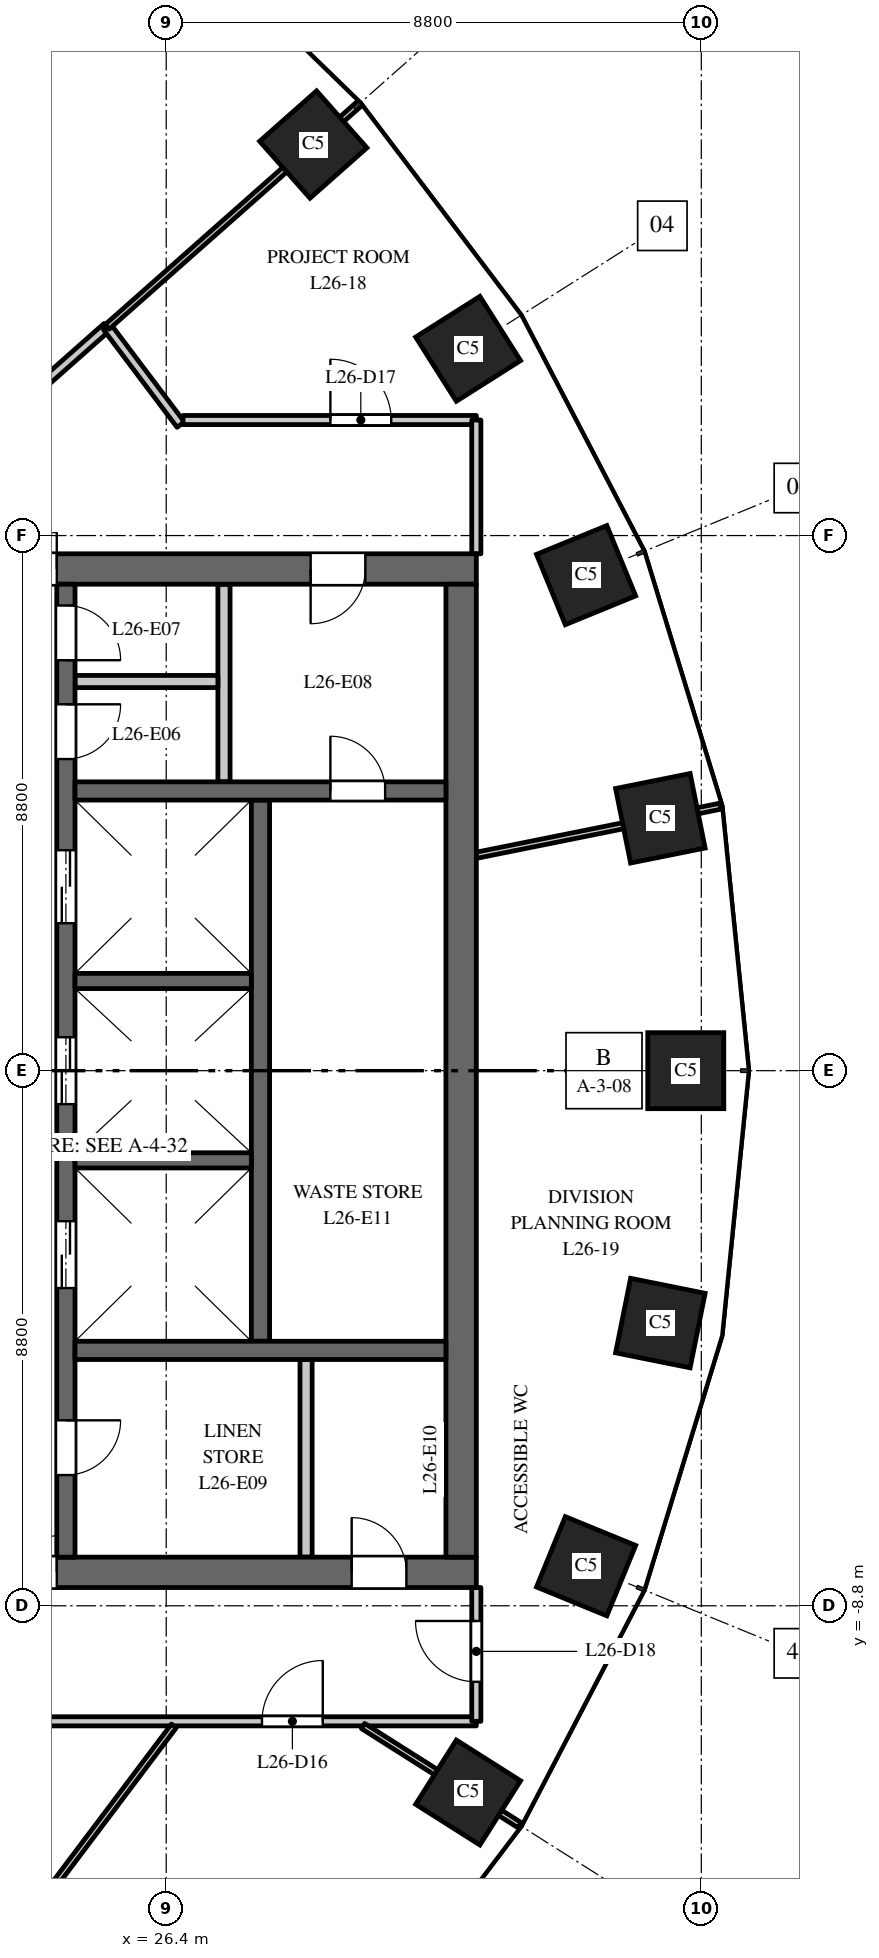
"""IFC4 building model, lengths in metres.
Left out: names, types, materials, properties, quantities, classifications, styles, units other than length and angle.
Written with IfcOpenShell. Run it as: python <this file> out.ifc"""

import sys

from ifc_helpers import new_model, si_unit, direction, frame, frame_2d, origin, origin_2d, place, context, subcontext, project, spatial, rectangle, extrude, element, fill, save


model = new_model("IFC4")
c1 = context("Model", 3, precision=1e-05, world=origin(), true_north=direction((0.0, 1.0)))
c2 = subcontext(c1, "Body", "Model", "MODEL_VIEW")
j1 = project(units=[si_unit("LENGTHUNIT", "METRE"), si_unit("PLANEANGLEUNIT", "RADIAN")], contexts=[c1])
p1 = place(None, origin())
s1 = spatial("IfcSite", under=j1, at=p1, CompositionType="ELEMENT")
p2 = place(p1, origin())
s2 = spatial("IfcBuilding", under=s1, at=p2, CompositionType="ELEMENT")
p3 = place(p2, frame((0.0, 0.0, 116.0)))
s3 = spatial("IfcBuildingStorey", under=s2, at=p3, CompositionType="ELEMENT", Elevation=116.0)
for number, where, z_axis, x_axis in (
    (1, (34.945, 0.0, 0.0), (0.0, 0.0, 1.0), (0.0, 1.0, 0.0)),
    (2, (34.527, 4.151, 0.0), (0.0, 0.0, 1.0), (-0.197, 0.98, 0.0)),
    (3, (33.305, 8.149, 0.0), (0.0, 0.0, 1.0), (-0.379, 0.925, 0.0)),
    (4, (31.365, 11.871, 0.0), (0.0, 0.0, 1.0), (-0.535, 0.845, 0.0)),
    (5, (28.819, 15.23, 0.0), (0.0, 0.0, 1.0), (-0.663, 0.749, 0.0)),
    (6, (31.365, -11.871, 0.0), (0.0, 0.0, 1.0), (0.535, 0.845, 0.0)),
    (7, (33.305, -8.149, 0.0), (0.0, 0.0, 1.0), (0.379, 0.925, 0.0)),
    (8, (34.527, -4.151, 0.0), (0.0, 0.0, 1.0), (0.197, 0.98, 0.0)),
):
    element("IfcColumn", number, at=place(p3, frame(where, z_axis=z_axis, x_axis=x_axis)), inside=s3, PredefinedType="COLUMN", context=c2, shape_type="SweptSolid", body=[
        extrude(rectangle(XDim=1.25, YDim=1.25, at=origin_2d()), origin(), (0.0, 0.0, 1.0), 4.0),
    ])
p4 = place(p3, frame((16.5, 8.25, 0.0), z_axis=(0.0, 0.0, 1.0), x_axis=(1.0, 0.0, 0.0)))
e9 = element("IfcWall", 9, at=p4, inside=s3, PredefinedType="SHEAR", context=c2, shape_type="SweptSolid", body=[
    extrude(rectangle(XDim=15.0, YDim=0.5, at=frame_2d((7.5, 0.0))), origin(), (0.0, 0.0, 1.0), 3.7),
])
p5 = place(p4, frame((6.9, 0.0, 0.0)))
e10 = element("IfcOpeningElement", 10, at=p5, cuts=e9, PredefinedType="OPENING", context=c2, shape_type="SweptSolid", body=[
    extrude(rectangle(XDim=1.2, YDim=2.1, at=frame_2d((0.6, 1.05))), frame((0.0, 0.26, 0.0), z_axis=(0.0, -1.0, 0.0), x_axis=(1.0, 0.0, 0.0)), (0.0, 0.0, 1.0), 0.52),
])
p6 = place(p4, frame((12.275, 0.0, 0.0)))
e11 = element("IfcOpeningElement", 11, at=p6, cuts=e9, PredefinedType="OPENING", context=c2, shape_type="SweptSolid", body=[
    extrude(rectangle(XDim=0.9, YDim=2.1, at=frame_2d((0.45, 1.05))), frame((0.0, 0.26, 0.0), z_axis=(0.0, -1.0, 0.0), x_axis=(1.0, 0.0, 0.0)), (0.0, 0.0, 1.0), 0.52),
])
p7 = place(p3, frame((16.5, -8.25, 0.0), z_axis=(0.0, 0.0, 1.0), x_axis=(1.0, 0.0, 0.0)))
e12 = element("IfcWall", 12, at=p7, inside=s3, PredefinedType="SHEAR", context=c2, shape_type="SweptSolid", body=[
    extrude(rectangle(XDim=15.0, YDim=0.5, at=frame_2d((7.5, 0.0))), origin(), (0.0, 0.0, 1.0), 3.7),
])
p8 = place(p7, frame((6.9, 0.0, 0.0)))
e13 = element("IfcOpeningElement", 13, at=p8, cuts=e12, PredefinedType="OPENING", context=c2, shape_type="SweptSolid", body=[
    extrude(rectangle(XDim=1.2, YDim=2.1, at=frame_2d((0.6, 1.05))), frame((0.0, 0.26, 0.0), z_axis=(0.0, -1.0, 0.0), x_axis=(1.0, 0.0, 0.0)), (0.0, 0.0, 1.0), 0.52),
])
p9 = place(p7, frame((12.95, 0.0, 0.0)))
e14 = element("IfcOpeningElement", 14, at=p9, cuts=e12, PredefinedType="OPENING", context=c2, shape_type="SweptSolid", body=[
    extrude(rectangle(XDim=0.9, YDim=2.1, at=frame_2d((0.45, 1.05))), frame((0.0, 0.26, 0.0), z_axis=(0.0, -1.0, 0.0), x_axis=(1.0, 0.0, 0.0)), (0.0, 0.0, 1.0), 0.52),
])
p10 = place(p3, frame((27.95, -4.45, 0.0), z_axis=(0.0, 0.0, 1.0), x_axis=(0.0, 1.0, 0.0)))
e15 = element("IfcWall", 15, at=p10, inside=s3, PredefinedType="SHEAR", context=c2, shape_type="SweptSolid", body=[
    extrude(rectangle(XDim=8.9, YDim=0.3, at=frame_2d((4.45, 0.0))), origin(), (0.0, 0.0, 1.0), 3.7),
])
p11 = place(p3, frame((24.75, -8.0, 0.0), z_axis=(0.0, 0.0, 1.0), x_axis=(0.0, 1.0, 0.0)))
e16 = element("IfcWall", 16, at=p11, inside=s3, PredefinedType="SHEAR", context=c2, shape_type="SweptSolid", body=[
    extrude(rectangle(XDim=16.0, YDim=0.3, at=frame_2d((8.0, 0.0))), origin(), (0.0, 0.0, 1.0), 3.7),
])
p12 = place(p11, frame((4.425, 0.0, 0.0)))
e17 = element("IfcOpeningElement", 17, at=p12, cuts=e16, PredefinedType="OPENING", context=c2, shape_type="SweptSolid", body=[
    extrude(rectangle(XDim=1.1, YDim=2.1, at=frame_2d((0.55, 1.05))), frame((0.0, 0.16, 0.0), z_axis=(0.0, -1.0, 0.0), x_axis=(1.0, 0.0, 0.0)), (0.0, 0.0, 1.0), 0.32),
])
p13 = place(p11, frame((7.45, 0.0, 0.0)))
e18 = element("IfcOpeningElement", 18, at=p13, cuts=e16, PredefinedType="OPENING", context=c2, shape_type="SweptSolid", body=[
    extrude(rectangle(XDim=1.1, YDim=2.1, at=frame_2d((0.55, 1.05))), frame((0.0, 0.16, 0.0), z_axis=(0.0, -1.0, 0.0), x_axis=(1.0, 0.0, 0.0)), (0.0, 0.0, 1.0), 0.32),
])
p14 = place(p11, frame((10.425, 0.0, 0.0)))
e19 = element("IfcOpeningElement", 19, at=p14, cuts=e16, PredefinedType="OPENING", context=c2, shape_type="SweptSolid", body=[
    extrude(rectangle(XDim=1.2, YDim=2.1, at=frame_2d((0.6, 1.05))), frame((0.0, 0.16, 0.0), z_axis=(0.0, -1.0, 0.0), x_axis=(1.0, 0.0, 0.0)), (0.0, 0.0, 1.0), 0.32),
])
p15 = place(p11, frame((13.125, 0.0, 0.0)))
e20 = element("IfcOpeningElement", 20, at=p15, cuts=e16, PredefinedType="OPENING", context=c2, shape_type="SweptSolid", body=[
    extrude(rectangle(XDim=0.9, YDim=2.1, at=frame_2d((0.45, 1.05))), frame((0.0, 0.16, 0.0), z_axis=(0.0, -1.0, 0.0), x_axis=(1.0, 0.0, 0.0)), (0.0, 0.0, 1.0), 0.32),
])
p16 = place(p11, frame((14.75, 0.0, 0.0)))
e21 = element("IfcOpeningElement", 21, at=p16, cuts=e16, PredefinedType="OPENING", context=c2, shape_type="SweptSolid", body=[
    extrude(rectangle(XDim=0.9, YDim=2.1, at=frame_2d((0.45, 1.05))), frame((0.0, 0.16, 0.0), z_axis=(0.0, -1.0, 0.0), x_axis=(1.0, 0.0, 0.0)), (0.0, 0.0, 1.0), 0.32),
])
p17 = place(p11, frame((1.35, 0.0, 0.0)))
e22 = element("IfcOpeningElement", 22, at=p17, cuts=e16, PredefinedType="OPENING", context=c2, shape_type="SweptSolid", body=[
    extrude(rectangle(XDim=0.9, YDim=2.1, at=frame_2d((0.45, 1.05))), frame((0.0, 0.16, 0.0), z_axis=(0.0, -1.0, 0.0), x_axis=(1.0, 0.0, 0.0)), (0.0, 0.0, 1.0), 0.32),
])
p18 = place(p3, frame((31.25, -8.0, 0.0), z_axis=(0.0, 0.0, 1.0), x_axis=(0.0, 1.0, 0.0)))
e23 = element("IfcWall", 23, at=p18, inside=s3, PredefinedType="SHEAR", context=c2, shape_type="SweptSolid", body=[
    extrude(rectangle(XDim=16.0, YDim=0.5, at=frame_2d((8.0, 0.0))), origin(), (0.0, 0.0, 1.0), 3.7),
])
p19 = place(p3, frame((24.9, 4.6, 0.0), z_axis=(0.0, 0.0, 1.0), x_axis=(1.0, 0.0, 0.0)))
e24 = element("IfcWall", 24, at=p19, inside=s3, PredefinedType="SHEAR", context=c2, shape_type="SweptSolid", body=[
    extrude(rectangle(XDim=6.1, YDim=0.3, at=frame_2d((3.05, 0.0))), origin(), (0.0, 0.0, 1.0), 3.7),
])
p20 = place(p19, frame((4.2, 0.0, 0.0)))
e25 = element("IfcOpeningElement", 25, at=p20, cuts=e24, PredefinedType="OPENING", context=c2, shape_type="SweptSolid", body=[
    extrude(rectangle(XDim=0.9, YDim=2.1, at=frame_2d((0.45, 1.05))), frame((0.0, 0.16, 0.0), z_axis=(0.0, -1.0, 0.0), x_axis=(1.0, 0.0, 0.0)), (0.0, 0.0, 1.0), 0.32),
])
for number, where, z_axis, x_axis in (
    (26, (27.35, 4.75, 0.0), (0.0, 0.0, 1.0), (0.0, 1.0, 0.0)),
    (27, (28.7, -8.0, 0.0), (0.0, 0.0, 1.0), (0.0, 1.0, 0.0)),
):
    element("IfcWall", number, at=place(p3, frame(where, z_axis=z_axis, x_axis=x_axis)), inside=s3, PredefinedType="PARTITIONING", context=c2, shape_type="SweptSolid", body=[
        extrude(rectangle(XDim=3.25, YDim=0.2, at=frame_2d((1.625, 0.0))), origin(), (0.0, 0.0, 1.0), 3.7),
    ])
p21 = place(p3, frame((24.9, 6.4, 0.0), z_axis=(0.0, 0.0, 1.0), x_axis=(1.0, 0.0, 0.0)))
e28 = element("IfcWall", 28, at=p21, inside=s3, PredefinedType="PARTITIONING", context=c2, shape_type="SweptSolid", body=[
    extrude(rectangle(XDim=2.35, YDim=0.2, at=frame_2d((1.175, 0.0))), origin(), (0.0, 0.0, 1.0), 3.7),
])
p22 = place(p3, frame((24.9, -4.6, 0.0), z_axis=(0.0, 0.0, 1.0), x_axis=(1.0, 0.0, 0.0)))
e29 = element("IfcWall", 29, at=p22, inside=s3, PredefinedType="SHEAR", context=c2, shape_type="SweptSolid", body=[
    extrude(rectangle(XDim=6.1, YDim=0.3, at=frame_2d((3.05, 0.0))), origin(), (0.0, 0.0, 1.0), 3.7),
])
for number, where, z_axis, x_axis in (
    (30, (24.9, -1.475, 0.0), (0.0, 0.0, 1.0), (1.0, 0.0, 0.0)),
    (31, (24.9, 1.475, 0.0), (0.0, 0.0, 1.0), (1.0, 0.0, 0.0)),
):
    element("IfcWall", number, at=place(p3, frame(where, z_axis=z_axis, x_axis=x_axis)), inside=s3, PredefinedType="SHEAR", context=c2, shape_type="SweptSolid", body=[
        extrude(rectangle(XDim=2.9, YDim=0.25, at=frame_2d((1.45, 0.0))), origin(), (0.0, 0.0, 1.0), 3.7),
    ])
p23 = place(p3, frame((20.603, -10.7, 0.0), z_axis=(0.0, 0.0, 1.0), x_axis=(1.0, 0.0, 0.0)))
e32 = element("IfcWall", 32, at=p23, inside=s3, PredefinedType="PARTITIONING", context=c2, shape_type="SweptSolid", body=[
    extrude(rectangle(XDim=10.897, YDim=0.15, at=frame_2d((5.448, 0.0))), origin(), (0.0, 0.0, 1.0), 2.9),
])
p24 = place(p23, frame((0.542, 0.0, 0.0)))
e33 = element("IfcOpeningElement", 33, at=p24, cuts=e32, PredefinedType="OPENING", context=c2, shape_type="SweptSolid", body=[
    extrude(rectangle(XDim=1.0, YDim=2.1, at=frame_2d((0.5, 1.05))), frame((0.0, 0.085, 0.0), z_axis=(0.0, -1.0, 0.0), x_axis=(1.0, 0.0, 0.0)), (0.0, 0.0, 1.0), 0.17),
])
p25 = place(p23, frame((7.372, 0.0, 0.0)))
e34 = element("IfcOpeningElement", 34, at=p25, cuts=e32, PredefinedType="OPENING", context=c2, shape_type="SweptSolid", body=[
    extrude(rectangle(XDim=1.0, YDim=2.1, at=frame_2d((0.5, 1.05))), frame((0.0, 0.085, 0.0), z_axis=(0.0, -1.0, 0.0), x_axis=(1.0, 0.0, 0.0)), (0.0, 0.0, 1.0), 0.17),
])
p26 = place(p3, frame((23.298, -15.06, 0.0), z_axis=(0.0, 0.0, 1.0), x_axis=(0.601658833238, 0.798753183647, 0.0)))
e35 = element("IfcWall", 35, at=p26, inside=s3, PredefinedType="PARTITIONING", context=c2, shape_type="SweptSolid", body=[
    extrude(rectangle(XDim=5.365, YDim=0.1, at=frame_2d((2.682, 0.0))), origin(), (0.0, 0.0, 1.0), 2.75),
])
p27 = place(p3, frame((23.785, 10.778, 0.0), z_axis=(0.0, 0.0, 1.0), x_axis=(0.748911595987, 0.662669918886, 0.0)))
e36 = element("IfcWall", 36, at=p27, inside=s3, PredefinedType="PARTITIONING", context=c2, shape_type="SweptSolid", body=[
    extrude(rectangle(XDim=2.194, YDim=0.15, at=frame_2d((1.097, 0.0))), origin(), (0.0, 0.0, 1.0), 3.7),
])
p28 = place(p3, frame((25.428, 12.232, 0.0), z_axis=(0.0, 0.0, 1.0), x_axis=(0.601513631979, -0.798862535449, 0.0)))
e37 = element("IfcWall", 37, at=p28, inside=s3, PredefinedType="PARTITIONING", context=c2, shape_type="SweptSolid", body=[
    extrude(rectangle(XDim=2.011, YDim=0.15, at=frame_2d((1.006, 0.0))), origin(), (0.0, 0.0, 1.0), 3.7),
])
p29 = place(p3, frame((25.428, 12.232, 0.0), z_axis=(0.0, 0.0, 1.0), x_axis=(0.749015105068, 0.662552920437, 0.0)))
e38 = element("IfcWall", 38, at=p29, inside=s3, PredefinedType="PARTITIONING", context=c2, shape_type="SweptSolid", body=[
    extrude(rectangle(XDim=5.529, YDim=0.1, at=frame_2d((2.764, 0.0))), origin(), (0.0, 0.0, 1.0), 3.7),
])
p30 = place(p3, frame((26.676, 10.7, 0.0), z_axis=(0.0, 0.0, 1.0), x_axis=(1.0, 0.0, 0.0)))
e39 = element("IfcWall", 39, at=p30, inside=s3, PredefinedType="PARTITIONING", context=c2, shape_type="SweptSolid", body=[
    extrude(rectangle(XDim=4.824, YDim=0.15, at=frame_2d((2.412, 0.0))), origin(), (0.0, 0.0, 1.0), 2.9),
])
p31 = place(p30, frame((2.424, 0.0, 0.0)))
e40 = element("IfcOpeningElement", 40, at=p31, cuts=e39, PredefinedType="OPENING", context=c2, shape_type="SweptSolid", body=[
    extrude(rectangle(XDim=1.0, YDim=2.1, at=frame_2d((0.5, 1.05))), frame((0.0, 0.085, 0.0), z_axis=(0.0, -1.0, 0.0), x_axis=(1.0, 0.0, 0.0)), (0.0, 0.0, 1.0), 0.17),
])
p32 = place(p3, frame((29.637, -10.777, 0.0), z_axis=(0.0, 0.0, 1.0), x_axis=(0.844810627195, -0.535065420467, 0.0)))
e41 = element("IfcWall", 41, at=p32, inside=s3, PredefinedType="PARTITIONING", context=c2, shape_type="SweptSolid", body=[
    extrude(rectangle(XDim=3.048, YDim=0.1, at=frame_2d((1.524, 0.0))), origin(), (0.0, 0.0, 1.0), 2.9),
])
p33 = place(p3, frame((31.5, -10.7, 0.0), z_axis=(0.0, 0.0, 1.0), x_axis=(0.0, 1.0, 0.0)))
e42 = element("IfcWall", 42, at=p33, inside=s3, PredefinedType="PARTITIONING", context=c2, shape_type="SweptSolid", body=[
    extrude(rectangle(XDim=2.2, YDim=0.15, at=frame_2d((1.1, 0.0))), origin(), (0.0, 0.0, 1.0), 2.9),
])
p34 = place(p33, frame((0.65, 0.0, 0.0)))
e43 = element("IfcOpeningElement", 43, at=p34, cuts=e42, PredefinedType="OPENING", context=c2, shape_type="SweptSolid", body=[
    extrude(rectangle(XDim=1.0, YDim=2.1, at=frame_2d((0.5, 1.05))), frame((0.0, 0.085, 0.0), z_axis=(0.0, -1.0, 0.0), x_axis=(1.0, 0.0, 0.0)), (0.0, 0.0, 1.0), 0.17),
])
p35 = place(p3, frame((31.5, 3.542, 0.0), z_axis=(0.0, 0.0, 1.0), x_axis=(0.980357474535, 0.197228857227, 0.0)))
e44 = element("IfcWall", 44, at=p35, inside=s3, PredefinedType="PARTITIONING", context=c2, shape_type="SweptSolid", body=[
    extrude(rectangle(XDim=4.092, YDim=0.1, at=frame_2d((2.046, 0.0))), origin(), (0.0, 0.0, 1.0), 2.9),
])
p36 = place(p3, frame((31.5, 8.5, 0.0), z_axis=(0.0, 0.0, 1.0), x_axis=(0.0, 1.0, 0.0)))
e45 = element("IfcWall", 45, at=p36, inside=s3, PredefinedType="PARTITIONING", context=c2, shape_type="SweptSolid", body=[
    extrude(rectangle(XDim=2.2, YDim=0.15, at=frame_2d((1.1, 0.0))), origin(), (0.0, 0.0, 1.0), 2.9),
])
p37 = place(p12, origin())
e46 = element("IfcDoor", 46, at=p37, inside=s3, OperationType="DOUBLE_DOOR_SLIDING", PredefinedType="DOOR", context=c2, shape_type="SweptSolid", body=[
    extrude(rectangle(XDim=1.1, YDim=2.1, at=frame_2d((0.55, 1.05))), frame((0.0, 0.025, 0.0), z_axis=(0.0, -1.0, 0.0), x_axis=(1.0, 0.0, 0.0)), (0.0, 0.0, 1.0), 0.05),
])
fill(e17, e46)
p38 = place(p13, origin())
e47 = element("IfcDoor", 47, at=p38, inside=s3, OperationType="DOUBLE_DOOR_SLIDING", PredefinedType="DOOR", context=c2, shape_type="SweptSolid", body=[
    extrude(rectangle(XDim=1.1, YDim=2.1, at=frame_2d((0.55, 1.05))), frame((0.0, 0.025, 0.0), z_axis=(0.0, -1.0, 0.0), x_axis=(1.0, 0.0, 0.0)), (0.0, 0.0, 1.0), 0.05),
])
fill(e18, e47)
p39 = place(p14, origin())
e48 = element("IfcDoor", 48, at=p39, inside=s3, OperationType="DOUBLE_DOOR_SLIDING", PredefinedType="DOOR", context=c2, shape_type="SweptSolid", body=[
    extrude(rectangle(XDim=1.2, YDim=2.1, at=frame_2d((0.6, 1.05))), frame((0.0, 0.025, 0.0), z_axis=(0.0, -1.0, 0.0), x_axis=(1.0, 0.0, 0.0)), (0.0, 0.0, 1.0), 0.05),
])
fill(e19, e48)
p40 = place(p5, origin())
e49 = element("IfcDoor", 49, at=p40, inside=s3, OperationType="DOUBLE_DOOR_DOUBLE_SWING", PredefinedType="DOOR", context=c2, shape_type="SweptSolid", body=[
    extrude(rectangle(XDim=1.2, YDim=2.1, at=frame_2d((0.6, 1.05))), frame((0.0, 0.025, 0.0), z_axis=(0.0, -1.0, 0.0), x_axis=(1.0, 0.0, 0.0)), (0.0, 0.0, 1.0), 0.05),
])
fill(e10, e49)
p41 = place(p8, origin())
e50 = element("IfcDoor", 50, at=p41, inside=s3, OperationType="DOUBLE_DOOR_DOUBLE_SWING", PredefinedType="DOOR", context=c2, shape_type="SweptSolid", body=[
    extrude(rectangle(XDim=1.2, YDim=2.1, at=frame_2d((0.6, 1.05))), frame((0.0, 0.025, 0.0), z_axis=(0.0, -1.0, 0.0), x_axis=(1.0, 0.0, 0.0)), (0.0, 0.0, 1.0), 0.05),
])
fill(e13, e50)
p42 = place(p15, origin())
e51 = element("IfcDoor", 51, at=p42, inside=s3, OperationType="SINGLE_SWING_RIGHT", PredefinedType="DOOR", context=c2, shape_type="SweptSolid", body=[
    extrude(rectangle(XDim=0.9, YDim=2.1, at=frame_2d((0.45, 1.05))), frame((0.0, 0.025, 0.0), z_axis=(0.0, -1.0, 0.0), x_axis=(1.0, 0.0, 0.0)), (0.0, 0.0, 1.0), 0.05),
])
fill(e20, e51)
p43 = place(p16, origin())
e52 = element("IfcDoor", 52, at=p43, inside=s3, OperationType="SINGLE_SWING_LEFT", PredefinedType="DOOR", context=c2, shape_type="SweptSolid", body=[
    extrude(rectangle(XDim=0.9, YDim=2.1, at=frame_2d((0.45, 1.05))), frame((0.0, 0.025, 0.0), z_axis=(0.0, -1.0, 0.0), x_axis=(1.0, 0.0, 0.0)), (0.0, 0.0, 1.0), 0.05),
])
fill(e21, e52)
p44 = place(p6, origin())
e53 = element("IfcDoor", 53, at=p44, inside=s3, OperationType="SINGLE_SWING_LEFT", PredefinedType="DOOR", context=c2, shape_type="SweptSolid", body=[
    extrude(rectangle(XDim=0.9, YDim=2.1, at=frame_2d((0.45, 1.05))), frame((0.0, 0.025, 0.0), z_axis=(0.0, -1.0, 0.0), x_axis=(1.0, 0.0, 0.0)), (0.0, 0.0, 1.0), 0.05),
])
fill(e11, e53)
p45 = place(p17, origin())
e54 = element("IfcDoor", 54, at=p45, inside=s3, OperationType="SINGLE_SWING_RIGHT", PredefinedType="DOOR", context=c2, shape_type="SweptSolid", body=[
    extrude(rectangle(XDim=0.9, YDim=2.1, at=frame_2d((0.45, 1.05))), frame((0.0, 0.025, 0.0), z_axis=(0.0, -1.0, 0.0), x_axis=(1.0, 0.0, 0.0)), (0.0, 0.0, 1.0), 0.05),
])
fill(e22, e54)
p46 = place(p9, origin())
e55 = element("IfcDoor", 55, at=p46, inside=s3, OperationType="SINGLE_SWING_RIGHT", PredefinedType="DOOR", context=c2, shape_type="SweptSolid", body=[
    extrude(rectangle(XDim=0.9, YDim=2.1, at=frame_2d((0.45, 1.05))), frame((0.0, 0.025, 0.0), z_axis=(0.0, -1.0, 0.0), x_axis=(1.0, 0.0, 0.0)), (0.0, 0.0, 1.0), 0.05),
])
fill(e14, e55)
p47 = place(p20, origin())
e56 = element("IfcDoor", 56, at=p47, inside=s3, OperationType="SINGLE_SWING_RIGHT", PredefinedType="DOOR", context=c2, shape_type="SweptSolid", body=[
    extrude(rectangle(XDim=0.9, YDim=2.1, at=frame_2d((0.45, 1.05))), frame((0.0, 0.025, 0.0), z_axis=(0.0, -1.0, 0.0), x_axis=(1.0, 0.0, 0.0)), (0.0, 0.0, 1.0), 0.05),
])
fill(e25, e56)
p48 = place(p25, origin())
e57 = element("IfcDoor", 57, at=p48, inside=s3, OperationType="SINGLE_SWING_RIGHT", PredefinedType="DOOR", context=c2, shape_type="SweptSolid", body=[
    extrude(rectangle(XDim=1.0, YDim=2.1, at=frame_2d((0.5, 1.05))), frame((0.0, 0.025, 0.0), z_axis=(0.0, -1.0, 0.0), x_axis=(1.0, 0.0, 0.0)), (0.0, 0.0, 1.0), 0.05),
])
fill(e34, e57)
p49 = place(p31, origin())
e58 = element("IfcDoor", 58, at=p49, inside=s3, OperationType="SINGLE_SWING_LEFT", PredefinedType="DOOR", context=c2, shape_type="SweptSolid", body=[
    extrude(rectangle(XDim=1.0, YDim=2.1, at=frame_2d((0.5, 1.05))), frame((0.0, 0.025, 0.0), z_axis=(0.0, -1.0, 0.0), x_axis=(1.0, 0.0, 0.0)), (0.0, 0.0, 1.0), 0.05),
])
fill(e40, e58)
p50 = place(p34, origin())
e59 = element("IfcDoor", 59, at=p50, inside=s3, OperationType="SINGLE_SWING_RIGHT", PredefinedType="DOOR", context=c2, shape_type="SweptSolid", body=[
    extrude(rectangle(XDim=1.0, YDim=2.1, at=frame_2d((0.5, 1.05))), frame((0.0, 0.025, 0.0), z_axis=(0.0, -1.0, 0.0), x_axis=(1.0, 0.0, 0.0)), (0.0, 0.0, 1.0), 0.05),
])
fill(e43, e59)
save(model, sys.argv[1])
